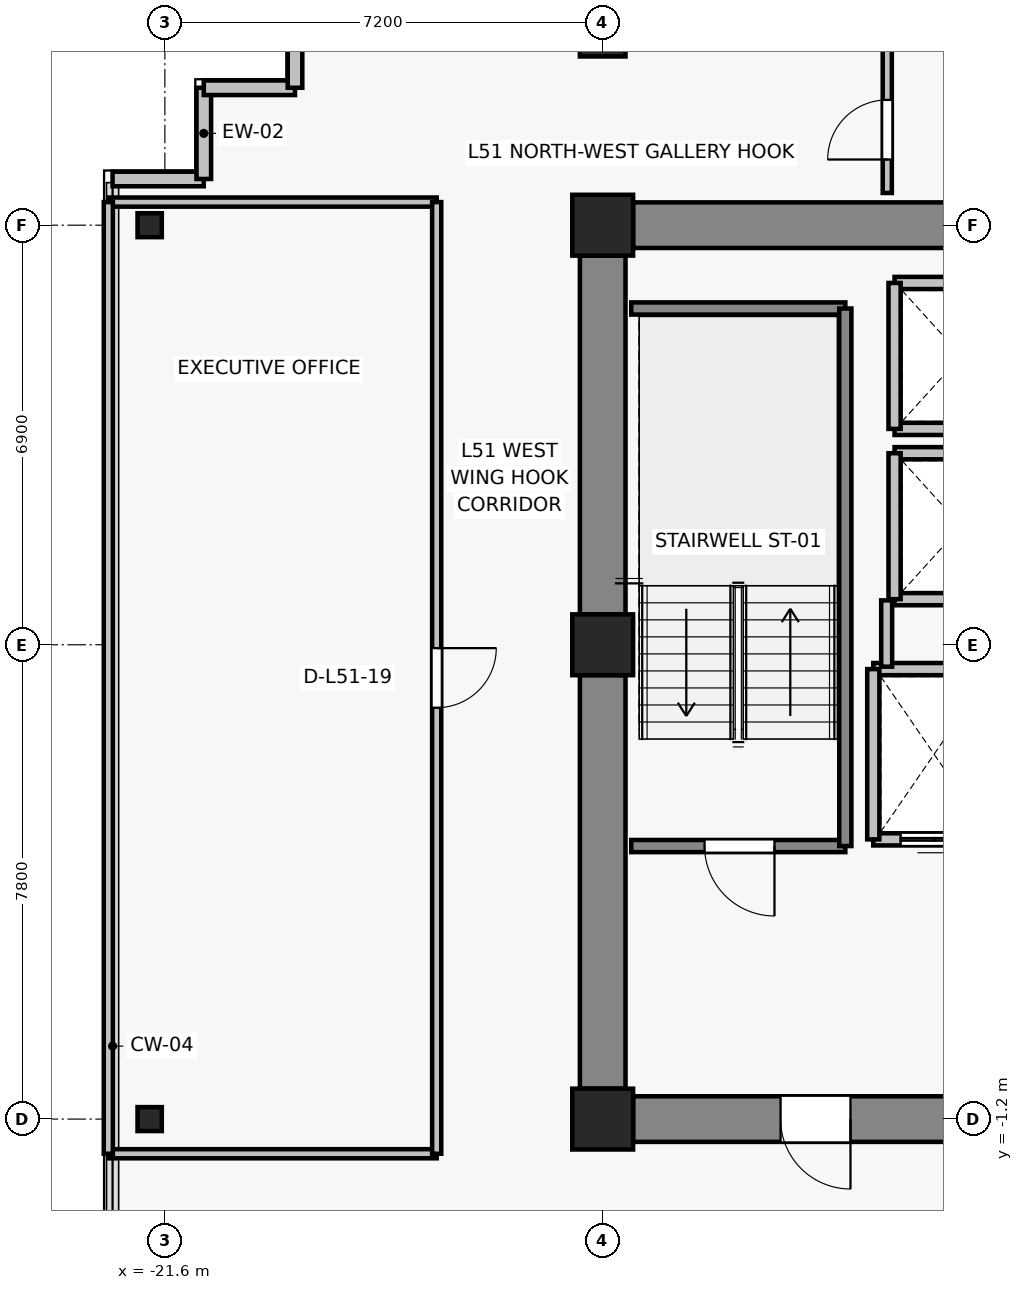
"""IFC4 building model, lengths in metres.
Left out: names, types, materials, properties, quantities, classifications, styles, units other than length and angle.
Written with IfcOpenShell. Run it as: python <this file> out.ifc"""

import sys

from ifc_helpers import new_model, si_unit, direction, frame, frame_2d, origin, origin_2d, place, context, subcontext, project, spatial, rectangle, i_section, extrude, source, transform, mapped, element, fill, save


model = new_model("IFC4")
c1 = context("Model", 3, precision=1e-05, world=origin(), true_north=direction((0.0, 1.0)))
c2 = subcontext(c1, "Body", "Model", "MODEL_VIEW")
j1 = project(units=[si_unit("LENGTHUNIT", "METRE"), si_unit("PLANEANGLEUNIT", "RADIAN")], contexts=[c1])
p1 = place(None, origin())
s1 = spatial("IfcSite", under=j1, at=p1, CompositionType="ELEMENT")
p2 = place(p1, origin())
s2 = spatial("IfcBuilding", under=s1, at=p2, CompositionType="ELEMENT")
p3 = place(p2, frame((0.0, 0.0, 182.5)))
s3 = spatial("IfcBuildingStorey", under=s2, at=p3, CompositionType="ELEMENT", Elevation=182.5)
for number, where, z_axis, x_axis in (
    (1, (-14.4, -1.2, 0.0), (0.0, 0.0, 1.0), (1.0, 0.0, 0.0)),
    (2, (-14.4, 6.6, 0.0), (0.0, 0.0, 1.0), (1.0, 0.0, 0.0)),
    (3, (-14.4, 13.5, 0.0), (0.0, 0.0, 1.0), (1.0, 0.0, 0.0)),
):
    element("IfcColumn", number, at=place(p3, frame(where, z_axis=z_axis, x_axis=x_axis)), inside=s3, PredefinedType="COLUMN", context=c2, shape_type="SweptSolid", body=[
        extrude(rectangle(XDim=1.0, YDim=1.0, at=origin_2d()), origin(), (0.0, 0.0, 1.0), 3.3),
    ])
p4 = place(p3, frame((-14.4, 16.65, 0.0), z_axis=(0.0, 0.0, 1.0), x_axis=(1.0, 0.0, 0.0)))
e4 = element("IfcColumn", 4, at=p4, inside=s3, PredefinedType="COLUMN", context=c2, shape_type="SweptSolid", body=[
    extrude(rectangle(XDim=0.75, YDim=0.75, at=origin_2d()), origin(), (0.0, 0.0, 1.0), 3.3),
])
for number, where, z_axis, x_axis in (
    (5, (-21.85, -1.2, 0.0), (0.0, 0.0, 1.0), (1.0, 0.0, 0.0)),
    (6, (-21.85, 13.5, 0.0), (0.0, 0.0, 1.0), (1.0, 0.0, 0.0)),
):
    element("IfcColumn", number, at=place(p3, frame(where, z_axis=z_axis, x_axis=x_axis)), inside=s3, PredefinedType="COLUMN", context=c2, shape_type="SweptSolid", body=[
        extrude(i_section(OverallWidth=0.399, OverallDepth=0.394, WebThickness=0.023, FlangeThickness=0.037, FilletRadius=0.015, at=origin_2d()), origin(), (0.0, 0.0, 1.0), 3.3),
    ])
p5 = place(p3, frame((-13.9, 13.5, 0.0), z_axis=(0.0, 0.0, 1.0), x_axis=(1.0, 0.0, 0.0)))
e7 = element("IfcWall", 7, at=p5, inside=s3, PredefinedType="SHEAR", context=c2, shape_type="SweptSolid", body=[
    extrude(rectangle(XDim=6.2, YDim=0.75, at=frame_2d((3.1, 0.0))), origin(), (0.0, 0.0, 1.0), 3.075),
])
p6 = place(p3, frame((-14.4, -0.7, 0.0), z_axis=(0.0, 0.0, 1.0), x_axis=(0.0, 1.0, 0.0)))
e8 = element("IfcWall", 8, at=p6, inside=s3, PredefinedType="SHEAR", context=c2, shape_type="SweptSolid", body=[
    extrude(rectangle(XDim=6.8, YDim=0.75, at=frame_2d((3.4, 0.0))), origin(), (0.0, 0.0, 1.0), 3.075),
])
p7 = place(p3, frame((-14.4, 7.1, 0.0), z_axis=(0.0, 0.0, 1.0), x_axis=(0.0, 1.0, 0.0)))
e9 = element("IfcWall", 9, at=p7, inside=s3, PredefinedType="SHEAR", context=c2, shape_type="SweptSolid", body=[
    extrude(rectangle(XDim=5.9, YDim=0.75, at=frame_2d((2.95, 0.0))), origin(), (0.0, 0.0, 1.0), 3.075),
])
p8 = place(p3, frame((-7.7, -1.2, 0.0), z_axis=(0.0, 0.0, 1.0), x_axis=(-1.0, 0.0, 0.0)))
e10 = element("IfcWall", 10, at=p8, inside=s3, PredefinedType="SHEAR", context=c2, shape_type="SweptSolid", body=[
    extrude(rectangle(XDim=6.2, YDim=0.75, at=frame_2d((3.1, 0.0))), origin(), (0.0, 0.0, 1.0), 3.075),
])
p9 = place(p8, frame((2.625, 0.0, 0.0)))
e11 = element("IfcOpeningElement", 11, at=p9, cuts=e10, PredefinedType="OPENING", context=c2, shape_type="SweptSolid", body=[
    extrude(rectangle(XDim=1.15, YDim=2.15, at=frame_2d((0.575, 1.075))), frame((0.0, 0.385, 0.0), z_axis=(0.0, -1.0, 0.0), x_axis=(1.0, 0.0, 0.0)), (0.0, 0.0, 1.0), 0.77),
])
for number, where, z_axis, x_axis in (
    (12, (-20.96, 14.26, 0.0), (0.0, 0.0, 1.0), (-1.0, 0.0, 0.0)),
    (13, (-20.96, 15.76, 0.0), (0.0, 0.0, 1.0), (0.0, -1.0, 0.0)),
    (14, (-19.46, 15.76, 0.0), (0.0, 0.0, 1.0), (-1.0, 0.0, 0.0)),
    (15, (-19.46, 17.26, 0.0), (0.0, 0.0, 1.0), (0.0, -1.0, 0.0)),
):
    element("IfcWall", number, at=place(p3, frame(where, z_axis=z_axis, x_axis=x_axis)), inside=s3, PredefinedType="SOLIDWALL", context=c2, shape_type="SweptSolid", body=[
        extrude(rectangle(XDim=1.5, YDim=0.24, at=frame_2d((0.75, 0.0))), origin(), (0.0, 0.0, 1.0), 3.075),
    ])
p10 = place(p3, frame((-7.95, 3.4, 0.0), z_axis=(0.0, 0.0, 1.0), x_axis=(-1.0, 0.0, 0.0)))
e16 = element("IfcWall", 16, at=p10, inside=s3, PredefinedType="SOLIDWALL", context=c2, shape_type="SweptSolid", body=[
    extrude(rectangle(XDim=2.0, YDim=0.2, at=frame_2d((1.0, 0.0))), origin(), (0.0, 0.0, 1.0), 3.075),
])
p11 = place(p10, frame((0.45, 0.0, 0.0)))
e17 = element("IfcOpeningElement", 17, at=p11, cuts=e16, PredefinedType="OPENING", context=c2, shape_type="SweptSolid", body=[
    extrude(rectangle(XDim=1.1, YDim=2.2, at=frame_2d((0.55, 1.1))), frame((0.0, 0.11, 0.0), z_axis=(0.0, -1.0, 0.0), x_axis=(1.0, 0.0, 0.0)), (0.0, 0.0, 1.0), 0.22),
])
p12 = place(p3, frame((-9.95, 6.2, 0.0), z_axis=(0.0, 0.0, 1.0), x_axis=(1.0, 0.0, 0.0)))
e18 = element("IfcWall", 18, at=p12, inside=s3, PredefinedType="SOLIDWALL", context=c2, shape_type="SweptSolid", body=[
    extrude(rectangle(XDim=2.0, YDim=0.2, at=frame_2d((1.0, 0.0))), origin(), (0.0, 0.0, 1.0), 3.075),
])
p13 = place(p3, frame((-9.95, 3.4, 0.0), z_axis=(0.0, 0.0, 1.0), x_axis=(0.0, 1.0, 0.0)))
e19 = element("IfcWall", 19, at=p13, inside=s3, PredefinedType="SOLIDWALL", context=c2, shape_type="SweptSolid", body=[
    extrude(rectangle(XDim=2.8, YDim=0.2, at=frame_2d((1.4, 0.0))), origin(), (0.0, 0.0, 1.0), 3.075),
])
for number, where, z_axis, x_axis in (
    (20, (-7.4, 7.35, 0.0), (0.0, 0.0, 1.0), (-1.0, 0.0, 0.0)),
    (21, (-9.6, 9.75, 0.0), (0.0, 0.0, 1.0), (1.0, 0.0, 0.0)),
):
    element("IfcWall", number, at=place(p3, frame(where, z_axis=z_axis, x_axis=x_axis)), inside=s3, PredefinedType="SOLIDWALL", context=c2, shape_type="SweptSolid", body=[
        extrude(rectangle(XDim=2.2, YDim=0.2, at=frame_2d((1.1, 0.0))), origin(), (0.0, 0.0, 1.0), 2.565),
    ])
p14 = place(p3, frame((-9.6, 7.35, 0.0), z_axis=(0.0, 0.0, 1.0), x_axis=(0.0, 1.0, 0.0)))
e22 = element("IfcWall", 22, at=p14, inside=s3, PredefinedType="SOLIDWALL", context=c2, shape_type="SweptSolid", body=[
    extrude(rectangle(XDim=2.4, YDim=0.2, at=frame_2d((1.2, 0.0))), origin(), (0.0, 0.0, 1.0), 3.075),
])
for number, where, z_axis, x_axis in (
    (23, (-7.4, 10.15, 0.0), (0.0, 0.0, 1.0), (-1.0, 0.0, 0.0)),
    (24, (-9.6, 12.55, 0.0), (0.0, 0.0, 1.0), (1.0, 0.0, 0.0)),
):
    element("IfcWall", number, at=place(p3, frame(where, z_axis=z_axis, x_axis=x_axis)), inside=s3, PredefinedType="SOLIDWALL", context=c2, shape_type="SweptSolid", body=[
        extrude(rectangle(XDim=2.2, YDim=0.2, at=frame_2d((1.1, 0.0))), origin(), (0.0, 0.0, 1.0), 2.565),
    ])
p15 = place(p3, frame((-9.6, 10.15, 0.0), z_axis=(0.0, 0.0, 1.0), x_axis=(0.0, 1.0, 0.0)))
e25 = element("IfcWall", 25, at=p15, inside=s3, PredefinedType="SOLIDWALL", context=c2, shape_type="SweptSolid", body=[
    extrude(rectangle(XDim=2.4, YDim=0.2, at=frame_2d((1.2, 0.0))), origin(), (0.0, 0.0, 1.0), 3.075),
])
p16 = place(p3, frame((-10.41, 3.29, 0.0), z_axis=(0.0, 0.0, 1.0), x_axis=(-1.0, 0.0, 0.0)))
e26 = element("IfcWall", 26, at=p16, inside=s3, PredefinedType="SOLIDWALL", context=c2, shape_type="SweptSolid", body=[
    extrude(rectangle(XDim=3.52, YDim=0.2, at=frame_2d((1.76, 0.0))), origin(), (0.0, 0.0, 1.0), 3.075),
])
p17 = place(p16, frame((1.165, 0.0, 0.0)))
e27 = element("IfcOpeningElement", 27, at=p17, cuts=e26, PredefinedType="OPENING", context=c2, shape_type="SweptSolid", body=[
    extrude(rectangle(XDim=1.15, YDim=2.15, at=frame_2d((0.575, 1.075))), frame((0.0, 0.11, 0.0), z_axis=(0.0, -1.0, 0.0), x_axis=(1.0, 0.0, 0.0)), (0.0, 0.0, 1.0), 0.22),
])
p18 = place(p3, frame((-13.93, 12.13, 0.0), z_axis=(0.0, 0.0, 1.0), x_axis=(1.0, 0.0, 0.0)))
e28 = element("IfcWall", 28, at=p18, inside=s3, PredefinedType="SOLIDWALL", context=c2, shape_type="SweptSolid", body=[
    extrude(rectangle(XDim=3.52, YDim=0.2, at=frame_2d((1.76, 0.0))), origin(), (0.0, 0.0, 1.0), 3.075),
])
p19 = place(p3, frame((-10.41, 12.13, 0.0), z_axis=(0.0, 0.0, 1.0), x_axis=(0.0, -1.0, 0.0)))
e29 = element("IfcWall", 29, at=p19, inside=s3, PredefinedType="SOLIDWALL", context=c2, shape_type="SweptSolid", body=[
    extrude(rectangle(XDim=8.84, YDim=0.2, at=frame_2d((4.42, 0.0))), origin(), (0.0, 0.0, 1.0), 3.075),
])
p20 = place(p3, frame((-9.73, 6.24, 0.0), z_axis=(0.0, 0.0, 1.0), x_axis=(0.0, 1.0, 0.0)))
e30 = element("IfcWall", 30, at=p20, inside=s3, PredefinedType="PARTITIONING", context=c2, shape_type="SweptSolid", body=[
    extrude(rectangle(XDim=1.09, YDim=0.18, at=frame_2d((0.545, 0.0))), origin(), (0.0, 0.0, 1.0), 3.075),
])
p21 = place(p3, frame((-17.13, -1.77, 0.0), z_axis=(0.0, 0.0, 1.0), x_axis=(-1.0, 0.0, 0.0)))
e31 = element("IfcWall", 31, at=p21, inside=s3, PredefinedType="PARTITIONING", context=c2, shape_type="SweptSolid", body=[
    extrude(rectangle(XDim=5.4, YDim=0.15, at=frame_2d((2.7, 0.0))), origin(), (0.0, 0.0, 1.0), 2.565),
])
p22 = place(p3, frame((-22.53, 13.88, 0.0), z_axis=(0.0, 0.0, 1.0), x_axis=(1.0, 0.0, 0.0)))
e32 = element("IfcWall", 32, at=p22, inside=s3, PredefinedType="PARTITIONING", context=c2, shape_type="SweptSolid", body=[
    extrude(rectangle(XDim=5.4, YDim=0.15, at=frame_2d((2.7, 0.0))), origin(), (0.0, 0.0, 1.0), 3.075),
])
p23 = place(p3, frame((-22.53, -1.77, 0.0), z_axis=(0.0, 0.0, 1.0), x_axis=(0.0, 1.0, 0.0)))
e33 = element("IfcWall", 33, at=p23, inside=s3, PredefinedType="PARTITIONING", context=c2, shape_type="SweptSolid", body=[
    extrude(rectangle(XDim=15.65, YDim=0.15, at=frame_2d((7.825, 0.0))), origin(), (0.0, 0.0, 1.0), 3.075),
])
p24 = place(p3, frame((-17.13, 13.88, 0.0), z_axis=(0.0, 0.0, 1.0), x_axis=(0.0, -1.0, 0.0)))
e34 = element("IfcWall", 34, at=p24, inside=s3, PredefinedType="PARTITIONING", context=c2, shape_type="SweptSolid", body=[
    extrude(rectangle(XDim=15.65, YDim=0.15, at=frame_2d((7.825, 0.0))), origin(), (0.0, 0.0, 1.0), 2.565),
])
p25 = place(p24, frame((7.335, 0.0, 0.0)))
e35 = element("IfcOpeningElement", 35, at=p25, cuts=e34, PredefinedType="OPENING", context=c2, shape_type="SweptSolid", body=[
    extrude(rectangle(XDim=0.98, YDim=2.15, at=frame_2d((0.49, 1.075))), frame((0.0, 0.085, 0.0), z_axis=(0.0, -1.0, 0.0), x_axis=(1.0, 0.0, 0.0)), (0.0, 0.0, 1.0), 0.17),
])
p26 = place(p3, frame((-9.72, 14.03, 0.0), z_axis=(0.0, 0.0, 1.0), x_axis=(0.0, 1.0, 0.0)))
e36 = element("IfcWall", 36, at=p26, inside=s3, PredefinedType="PARTITIONING", context=c2, shape_type="SweptSolid", body=[
    extrude(rectangle(XDim=3.3, YDim=0.15, at=frame_2d((1.65, 0.0))), origin(), (0.0, 0.0, 1.0), 2.565),
])
p27 = place(p26, frame((0.55, 0.0, 0.0)))
e37 = element("IfcOpeningElement", 37, at=p27, cuts=e36, PredefinedType="OPENING", context=c2, shape_type="SweptSolid", body=[
    extrude(rectangle(XDim=0.98, YDim=2.15, at=frame_2d((0.49, 1.075))), frame((0.0, 0.085, 0.0), z_axis=(0.0, -1.0, 0.0), x_axis=(1.0, 0.0, 0.0)), (0.0, 0.0, 1.0), 0.17),
])
m1 = source(origin(), c2, "Body", "SweptSolid", [
    extrude(rectangle(XDim=1.1, YDim=2.2, at=frame_2d((0.55, 1.1))), frame((0.0, 0.025, 0.0), z_axis=(0.0, -1.0, 0.0), x_axis=(1.0, 0.0, 0.0)), (0.0, 0.0, 1.0), 0.05),
])
p28 = place(p11, origin())
e38 = element("IfcDoor", 38, at=p28, inside=s3, OperationType="DOUBLE_DOOR_SLIDING", PredefinedType="DOOR", context=c2, shape_type="MappedRepresentation", body=[
    mapped(m1, transform((0.0, 0.0, 0.0), x_axis=(1.0, 0.0, 0.0), y_axis=(0.0, 1.0, 0.0), z_axis=(0.0, 0.0, 1.0), scale=1.0)),
])
fill(e17, e38)
m2 = source(origin(), c2, "Body", "SweptSolid", [
    extrude(rectangle(XDim=1.15, YDim=2.15, at=frame_2d((0.575, 1.075))), frame((0.0, 0.025, 0.0), z_axis=(0.0, -1.0, 0.0), x_axis=(1.0, 0.0, 0.0)), (0.0, 0.0, 1.0), 0.05),
])
p29 = place(p17, origin())
e39 = element("IfcDoor", 39, at=p29, inside=s3, OperationType="SINGLE_SWING_LEFT", PredefinedType="DOOR", context=c2, shape_type="MappedRepresentation", body=[
    mapped(m2, transform((0.0, 0.0, 0.0), x_axis=(1.0, 0.0, 0.0), y_axis=(0.0, 1.0, 0.0), z_axis=(0.0, 0.0, 1.0), scale=1.0)),
])
fill(e27, e39)
p30 = place(p9, origin())
e40 = element("IfcDoor", 40, at=p30, inside=s3, OperationType="SINGLE_SWING_LEFT", PredefinedType="DOOR", context=c2, shape_type="MappedRepresentation", body=[
    mapped(m2, transform((0.0, 0.0, 0.0), x_axis=(1.0, 0.0, 0.0), y_axis=(0.0, 1.0, 0.0), z_axis=(0.0, 0.0, 1.0), scale=1.0)),
])
fill(e11, e40)
m3 = source(origin(), c2, "Body", "SweptSolid", [
    extrude(rectangle(XDim=0.98, YDim=2.15, at=frame_2d((0.49, 1.075))), frame((0.0, 0.025, 0.0), z_axis=(0.0, -1.0, 0.0), x_axis=(1.0, 0.0, 0.0)), (0.0, 0.0, 1.0), 0.05),
])
p31 = place(p25, origin())
e41 = element("IfcDoor", 41, at=p31, inside=s3, OperationType="SINGLE_SWING_LEFT", PredefinedType="DOOR", context=c2, shape_type="MappedRepresentation", body=[
    mapped(m3, transform((0.0, 0.0, 0.0), x_axis=(1.0, 0.0, 0.0), y_axis=(0.0, 1.0, 0.0), z_axis=(0.0, 0.0, 1.0), scale=1.0)),
])
fill(e35, e41)
p32 = place(p27, origin())
e42 = element("IfcDoor", 42, at=p32, inside=s3, OperationType="SINGLE_SWING_LEFT", PredefinedType="DOOR", context=c2, shape_type="MappedRepresentation", body=[
    mapped(m3, transform((0.0, 0.0, 0.0), x_axis=(1.0, 0.0, 0.0), y_axis=(0.0, 1.0, 0.0), z_axis=(0.0, 0.0, 1.0), scale=1.0)),
])
fill(e37, e42)
save(model, sys.argv[1])
